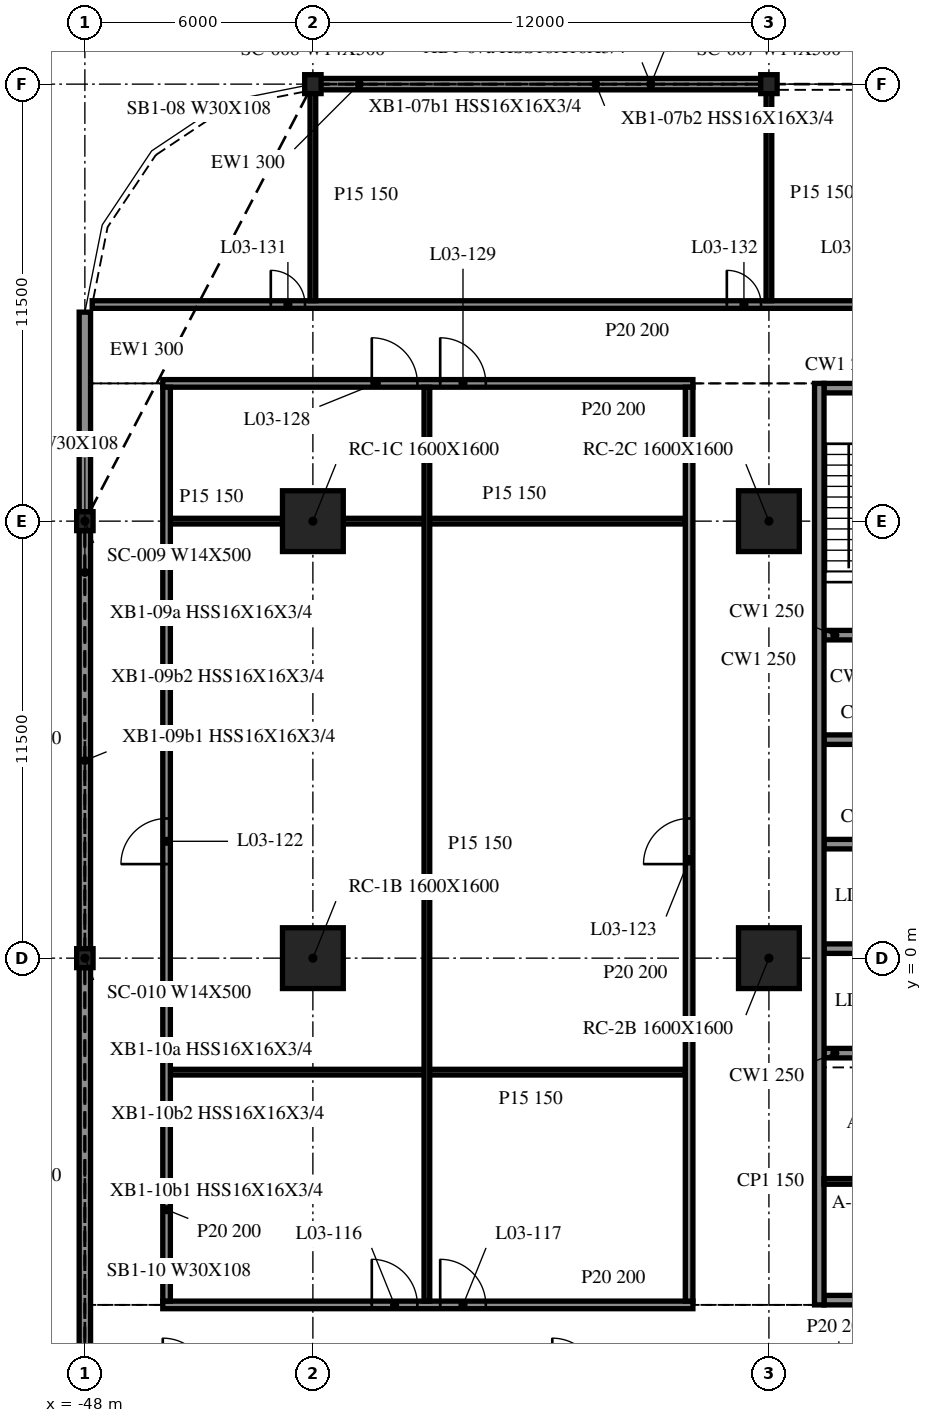
"""IFC4 building model, lengths in metres.
Left out: names, types, materials, properties, quantities, classifications, styles, units other than length and angle.
Written with IfcOpenShell. Run it as: python <this file> out.ifc"""

import sys

from ifc_helpers import new_model, si_unit, direction, frame, frame_2d, origin, origin_2d, place, context, subcontext, project, spatial, rectangle, i_section, extrude, element, fill, save


model = new_model("IFC4")
c1 = context("Model", 3, precision=1e-05, world=origin(), true_north=direction((0.0, 1.0)))
c2 = subcontext(c1, "Body", "Model", "MODEL_VIEW")
j1 = project(units=[si_unit("LENGTHUNIT", "METRE"), si_unit("PLANEANGLEUNIT", "RADIAN")], contexts=[c1])
p1 = place(None, origin())
s1 = spatial("IfcSite", under=j1, at=p1, CompositionType="ELEMENT")
p2 = place(p1, origin())
s2 = spatial("IfcBuilding", under=s1, at=p2, CompositionType="ELEMENT")
p3 = place(p2, frame((0.0, 0.0, 15.8)))
s3 = spatial("IfcBuildingStorey", under=s2, at=p3, CompositionType="ELEMENT", Elevation=15.8)
for number, where, z_axis, x_axis in (
    (1, (-42.0, 0.0, -0.34), (0.0, 0.0, 1.0), (1.0, 0.0, 0.0)),
    (2, (-42.0, 11.5, -0.34), (0.0, 0.0, 1.0), (1.0, 0.0, 0.0)),
    (3, (-30.0, 0.0, -0.34), (0.0, 0.0, 1.0), (1.0, 0.0, 0.0)),
    (4, (-30.0, 11.5, -0.34), (0.0, 0.0, 1.0), (1.0, 0.0, 0.0)),
):
    element("IfcColumn", number, at=place(p3, frame(where, z_axis=z_axis, x_axis=x_axis)), inside=s3, PredefinedType="COLUMN", context=c2, shape_type="SweptSolid", body=[
        extrude(rectangle(XDim=1.6, YDim=1.6, at=origin_2d()), origin(), (0.0, 0.0, 1.0), 4.3),
    ])
for number, where, z_axis, x_axis in (
    (5, (-30.0, 23.0, -0.34), (0.0, 0.0, 1.0), (1.0, 0.0, 0.0)),
    (6, (-42.0, 23.0, -0.34), (0.0, 0.0, 1.0), (1.0, 0.0, 0.0)),
    (7, (-48.0, 11.5, -0.34), (0.0, 0.0, 1.0), (1.0, 0.0, 0.0)),
    (8, (-48.0, 0.0, -0.34), (0.0, 0.0, 1.0), (1.0, 0.0, 0.0)),
):
    element("IfcColumn", number, at=place(p3, frame(where, z_axis=z_axis, x_axis=x_axis)), inside=s3, PredefinedType="COLUMN", context=c2, shape_type="SweptSolid", body=[
        extrude(i_section(OverallWidth=0.432, OverallDepth=0.498, WebThickness=0.056, FlangeThickness=0.089, at=origin_2d()), origin(), (0.0, 0.0, 1.0), 4.3),
    ])
p4 = place(p3, frame((-30.028, 23.0, 0.0), z_axis=(0.0, 0.0, 1.0), x_axis=(-1.0, 0.0, 0.0)))
e9 = element("IfcWall", 9, at=p4, inside=s3, PredefinedType="NOTDEFINED", context=c2, shape_type="SweptSolid", body=[
    extrude(rectangle(XDim=11.944, YDim=0.3, at=frame_2d((5.972, 0.0))), origin(), (0.0, 0.0, 1.0), 3.203),
])
p5 = place(p3, frame((-48.0, 17.0, 0.0), z_axis=(0.0, 0.0, 1.0), x_axis=(0.0, -1.0, 0.0)))
e10 = element("IfcWall", 10, at=p5, inside=s3, PredefinedType="NOTDEFINED", context=c2, shape_type="SweptSolid", body=[
    extrude(rectangle(XDim=5.251, YDim=0.3, at=frame_2d((2.625, 0.0))), origin(), (0.0, 0.0, 1.0), 3.203),
])
for number, where, z_axis, x_axis in (
    (11, (-48.0, 11.251, 0.0), (0.0, 0.0, 1.0), (0.0, -1.0, 0.0)),
    (12, (-48.0, -0.249, 0.0), (0.0, 0.0, 1.0), (0.0, -1.0, 0.0)),
):
    element("IfcWall", number, at=place(p3, frame(where, z_axis=z_axis, x_axis=x_axis)), inside=s3, PredefinedType="NOTDEFINED", context=c2, shape_type="SweptSolid", body=[
        extrude(rectangle(XDim=11.002, YDim=0.3, at=frame_2d((5.501, 0.0))), origin(), (0.0, 0.0, 1.0), 3.203),
    ])
p6 = place(p3, frame((-28.675, 15.125, 0.0), z_axis=(0.0, 0.0, 1.0), x_axis=(0.0, -1.0, 0.0)))
e13 = element("IfcWall", 13, at=p6, inside=s3, PredefinedType="SOLIDWALL", context=c2, shape_type="SweptSolid", body=[
    extrude(rectangle(XDim=24.25, YDim=0.25, at=frame_2d((12.125, 0.0))), origin(), (0.0, 0.0, 1.0), 3.96),
])
p7 = place(p3, frame((-19.45, -9.0, 0.0), z_axis=(0.0, 0.0, 1.0), x_axis=(-1.0, 0.0, 0.0)))
e14 = element("IfcWall", 14, at=p7, inside=s3, PredefinedType="SOLIDWALL", context=c2, shape_type="SweptSolid", body=[
    extrude(rectangle(XDim=9.1, YDim=0.25, at=frame_2d((4.55, 0.0))), origin(), (0.0, 0.0, 1.0), 3.96),
])
p8 = place(p7, frame((3.65, 0.0, 0.0)))
e15 = element("IfcOpeningElement", 15, at=p8, cuts=e14, PredefinedType="OPENING", context=c2, shape_type="SweptSolid", body=[
    extrude(rectangle(XDim=1.8, YDim=2.1, at=frame_2d((0.9, 1.05))), frame((0.0, 0.135, 0.0), z_axis=(0.0, -1.0, 0.0), x_axis=(1.0, 0.0, 0.0)), (0.0, 0.0, 1.0), 0.27),
])
p9 = place(p3, frame((-28.55, 15.0, 0.0), z_axis=(0.0, 0.0, 1.0), x_axis=(1.0, 0.0, 0.0)))
e16 = element("IfcWall", 16, at=p9, inside=s3, PredefinedType="SOLIDWALL", context=c2, shape_type="SweptSolid", body=[
    extrude(rectangle(XDim=9.1, YDim=0.25, at=frame_2d((4.55, 0.0))), origin(), (0.0, 0.0, 1.0), 3.96),
])
p10 = place(p9, frame((3.65, 0.0, 0.0)))
e17 = element("IfcOpeningElement", 17, at=p10, cuts=e16, PredefinedType="OPENING", context=c2, shape_type="SweptSolid", body=[
    extrude(rectangle(XDim=1.8, YDim=2.1, at=frame_2d((0.9, 1.05))), frame((0.0, 0.135, 0.0), z_axis=(0.0, -1.0, 0.0), x_axis=(1.0, 0.0, 0.0)), (0.0, 0.0, 1.0), 0.27),
])
for number, where, z_axis, x_axis in (
    (18, (-28.55, -2.5, 0.0), (0.0, 0.0, 1.0), (1.0, 0.0, 0.0)),
    (19, (-28.55, 0.25, 0.0), (0.0, 0.0, 1.0), (1.0, 0.0, 0.0)),
    (20, (-28.55, 3.0, 0.0), (0.0, 0.0, 1.0), (1.0, 0.0, 0.0)),
    (21, (-28.55, 5.75, 0.0), (0.0, 0.0, 1.0), (1.0, 0.0, 0.0)),
    (22, (-28.55, 8.5, 0.0), (0.0, 0.0, 1.0), (1.0, 0.0, 0.0)),
):
    element("IfcWall", number, at=place(p3, frame(where, z_axis=z_axis, x_axis=x_axis)), inside=s3, PredefinedType="SOLIDWALL", context=c2, shape_type="SweptSolid", body=[
        extrude(rectangle(XDim=2.85, YDim=0.25, at=frame_2d((1.425, 0.0))), origin(), (0.0, 0.0, 1.0), 3.96),
    ])
p11 = place(p3, frame((-28.55, -5.875, 0.0), z_axis=(0.0, 0.0, 1.0), x_axis=(1.0, 0.0, 0.0)))
e23 = element("IfcWall", 23, at=p11, inside=s3, PredefinedType="PARTITIONING", context=c2, shape_type="SweptSolid", body=[
    extrude(rectangle(XDim=2.85, YDim=0.15, at=frame_2d((1.425, 0.0))), origin(), (0.0, 0.0, 1.0), 3.96),
])
p12 = place(p3, frame((-45.95, -9.125, 0.0), z_axis=(0.0, 0.0, 1.0), x_axis=(1.0, 0.0, 0.0)))
e24 = element("IfcWall", 24, at=p12, inside=s3, PredefinedType="PARTITIONING", context=c2, shape_type="SweptSolid", body=[
    extrude(rectangle(XDim=13.95, YDim=0.2, at=frame_2d((6.975, 0.0))), origin(), (0.0, 0.0, 1.0), 3.96),
])
p13 = place(p12, frame((5.5, 0.0, 0.0)))
e25 = element("IfcOpeningElement", 25, at=p13, cuts=e24, PredefinedType="OPENING", context=c2, shape_type="SweptSolid", body=[
    extrude(rectangle(XDim=1.2, YDim=2.1, at=frame_2d((0.6, 1.05))), frame((0.0, 0.11, 0.0), z_axis=(0.0, -1.0, 0.0), x_axis=(1.0, 0.0, 0.0)), (0.0, 0.0, 1.0), 0.22),
])
p14 = place(p12, frame((7.3, 0.0, 0.0)))
e26 = element("IfcOpeningElement", 26, at=p14, cuts=e24, PredefinedType="OPENING", context=c2, shape_type="SweptSolid", body=[
    extrude(rectangle(XDim=1.2, YDim=2.1, at=frame_2d((0.6, 1.05))), frame((0.0, 0.11, 0.0), z_axis=(0.0, -1.0, 0.0), x_axis=(1.0, 0.0, 0.0)), (0.0, 0.0, 1.0), 0.22),
])
p15 = place(p3, frame((-45.75, -3.0, 0.0), z_axis=(0.0, 0.0, 1.0), x_axis=(1.0, 0.0, 0.0)))
e27 = element("IfcWall", 27, at=p15, inside=s3, PredefinedType="PARTITIONING", context=c2, shape_type="SweptSolid", body=[
    extrude(rectangle(XDim=13.55, YDim=0.15, at=frame_2d((6.775, 0.0))), origin(), (0.0, 0.0, 1.0), 3.96),
])
p16 = place(p3, frame((-45.75, 11.5, 0.0), z_axis=(0.0, 0.0, 1.0), x_axis=(1.0, 0.0, 0.0)))
e28 = element("IfcWall", 28, at=p16, inside=s3, PredefinedType="PARTITIONING", context=c2, shape_type="SweptSolid", body=[
    extrude(rectangle(XDim=2.95, YDim=0.15, at=frame_2d((1.475, 0.0))), origin(), (0.0, 0.0, 1.0), 3.96),
])
p17 = place(p3, frame((-41.2, 11.5, 0.0), z_axis=(0.0, 0.0, 1.0), x_axis=(1.0, 0.0, 0.0)))
e29 = element("IfcWall", 29, at=p17, inside=s3, PredefinedType="PARTITIONING", context=c2, shape_type="SweptSolid", body=[
    extrude(rectangle(XDim=9.0, YDim=0.15, at=frame_2d((4.5, 0.0))), origin(), (0.0, 0.0, 1.0), 3.96),
])
p18 = place(p3, frame((-45.95, 15.125, 0.0), z_axis=(0.0, 0.0, 1.0), x_axis=(1.0, 0.0, 0.0)))
e30 = element("IfcWall", 30, at=p18, inside=s3, PredefinedType="PARTITIONING", context=c2, shape_type="SweptSolid", body=[
    extrude(rectangle(XDim=13.95, YDim=0.2, at=frame_2d((6.975, 0.0))), origin(), (0.0, 0.0, 1.0), 3.96),
])
p19 = place(p18, frame((5.5, 0.0, 0.0)))
e31 = element("IfcOpeningElement", 31, at=p19, cuts=e30, PredefinedType="OPENING", context=c2, shape_type="SweptSolid", body=[
    extrude(rectangle(XDim=1.2, YDim=2.1, at=frame_2d((0.6, 1.05))), frame((0.0, 0.11, 0.0), z_axis=(0.0, -1.0, 0.0), x_axis=(1.0, 0.0, 0.0)), (0.0, 0.0, 1.0), 0.22),
])
p20 = place(p18, frame((7.3, 0.0, 0.0)))
e32 = element("IfcOpeningElement", 32, at=p20, cuts=e30, PredefinedType="OPENING", context=c2, shape_type="SweptSolid", body=[
    extrude(rectangle(XDim=1.2, YDim=2.1, at=frame_2d((0.6, 1.05))), frame((0.0, 0.11, 0.0), z_axis=(0.0, -1.0, 0.0), x_axis=(1.0, 0.0, 0.0)), (0.0, 0.0, 1.0), 0.22),
])
p21 = place(p3, frame((-47.807, 17.2, 0.0), z_axis=(0.0, 0.0, 1.0), x_axis=(1.0, 0.0, 0.0)))
e33 = element("IfcWall", 33, at=p21, inside=s3, PredefinedType="PARTITIONING", context=c2, shape_type="SweptSolid", body=[
    extrude(rectangle(XDim=95.615, YDim=0.2, at=frame_2d((47.807, 0.0))), origin(), (0.0, 0.0, 1.0), 3.96),
])
p22 = place(p21, frame((4.7, 0.0, 0.0)))
e34 = element("IfcOpeningElement", 34, at=p22, cuts=e33, PredefinedType="OPENING", context=c2, shape_type="SweptSolid", body=[
    extrude(rectangle(XDim=0.9, YDim=2.1, at=frame_2d((0.45, 1.05))), frame((0.0, 0.11, 0.0), z_axis=(0.0, -1.0, 0.0), x_axis=(1.0, 0.0, 0.0)), (0.0, 0.0, 1.0), 0.22),
])
p23 = place(p21, frame((16.7, 0.0, 0.0)))
e35 = element("IfcOpeningElement", 35, at=p23, cuts=e33, PredefinedType="OPENING", context=c2, shape_type="SweptSolid", body=[
    extrude(rectangle(XDim=0.9, YDim=2.1, at=frame_2d((0.45, 1.05))), frame((0.0, 0.11, 0.0), z_axis=(0.0, -1.0, 0.0), x_axis=(1.0, 0.0, 0.0)), (0.0, 0.0, 1.0), 0.22),
])
p24 = place(p21, frame((20.1, 0.0, 0.0)))
e36 = element("IfcOpeningElement", 36, at=p24, cuts=e33, PredefinedType="OPENING", context=c2, shape_type="SweptSolid", body=[
    extrude(rectangle(XDim=0.9, YDim=2.1, at=frame_2d((0.45, 1.05))), frame((0.0, 0.11, 0.0), z_axis=(0.0, -1.0, 0.0), x_axis=(1.0, 0.0, 0.0)), (0.0, 0.0, 1.0), 0.22),
])
p25 = place(p21, frame((22.7, 0.0, 0.0)))
e37 = element("IfcOpeningElement", 37, at=p25, cuts=e33, PredefinedType="OPENING", context=c2, shape_type="SweptSolid", body=[
    extrude(rectangle(XDim=0.9, YDim=2.1, at=frame_2d((0.45, 1.05))), frame((0.0, 0.11, 0.0), z_axis=(0.0, -1.0, 0.0), x_axis=(1.0, 0.0, 0.0)), (0.0, 0.0, 1.0), 0.22),
])
p26 = place(p21, frame((28.7, 0.0, 0.0)))
e38 = element("IfcOpeningElement", 38, at=p26, cuts=e33, PredefinedType="OPENING", context=c2, shape_type="SweptSolid", body=[
    extrude(rectangle(XDim=0.9, YDim=2.1, at=frame_2d((0.45, 1.05))), frame((0.0, 0.11, 0.0), z_axis=(0.0, -1.0, 0.0), x_axis=(1.0, 0.0, 0.0)), (0.0, 0.0, 1.0), 0.22),
])
p27 = place(p21, frame((40.7, 0.0, 0.0)))
e39 = element("IfcOpeningElement", 39, at=p27, cuts=e33, PredefinedType="OPENING", context=c2, shape_type="SweptSolid", body=[
    extrude(rectangle(XDim=0.9, YDim=2.1, at=frame_2d((0.45, 1.05))), frame((0.0, 0.11, 0.0), z_axis=(0.0, -1.0, 0.0), x_axis=(1.0, 0.0, 0.0)), (0.0, 0.0, 1.0), 0.22),
])
p28 = place(p21, frame((44.1, 0.0, 0.0)))
e40 = element("IfcOpeningElement", 40, at=p28, cuts=e33, PredefinedType="OPENING", context=c2, shape_type="SweptSolid", body=[
    extrude(rectangle(XDim=0.9, YDim=2.1, at=frame_2d((0.45, 1.05))), frame((0.0, 0.11, 0.0), z_axis=(0.0, -1.0, 0.0), x_axis=(1.0, 0.0, 0.0)), (0.0, 0.0, 1.0), 0.22),
])
p29 = place(p21, frame((46.7, 0.0, 0.0)))
e41 = element("IfcOpeningElement", 41, at=p29, cuts=e33, PredefinedType="OPENING", context=c2, shape_type="SweptSolid", body=[
    extrude(rectangle(XDim=0.9, YDim=2.1, at=frame_2d((0.45, 1.05))), frame((0.0, 0.11, 0.0), z_axis=(0.0, -1.0, 0.0), x_axis=(1.0, 0.0, 0.0)), (0.0, 0.0, 1.0), 0.22),
])
p30 = place(p21, frame((48.1, 0.0, 0.0)))
e42 = element("IfcOpeningElement", 42, at=p30, cuts=e33, PredefinedType="OPENING", context=c2, shape_type="SweptSolid", body=[
    extrude(rectangle(XDim=0.9, YDim=2.1, at=frame_2d((0.45, 1.05))), frame((0.0, 0.11, 0.0), z_axis=(0.0, -1.0, 0.0), x_axis=(1.0, 0.0, 0.0)), (0.0, 0.0, 1.0), 0.22),
])
p31 = place(p21, frame((54.1, 0.0, 0.0)))
e43 = element("IfcOpeningElement", 43, at=p31, cuts=e33, PredefinedType="OPENING", context=c2, shape_type="SweptSolid", body=[
    extrude(rectangle(XDim=0.9, YDim=2.1, at=frame_2d((0.45, 1.05))), frame((0.0, 0.11, 0.0), z_axis=(0.0, -1.0, 0.0), x_axis=(1.0, 0.0, 0.0)), (0.0, 0.0, 1.0), 0.22),
])
p32 = place(p21, frame((66.1, 0.0, 0.0)))
e44 = element("IfcOpeningElement", 44, at=p32, cuts=e33, PredefinedType="OPENING", context=c2, shape_type="SweptSolid", body=[
    extrude(rectangle(XDim=0.9, YDim=2.1, at=frame_2d((0.45, 1.05))), frame((0.0, 0.11, 0.0), z_axis=(0.0, -1.0, 0.0), x_axis=(1.0, 0.0, 0.0)), (0.0, 0.0, 1.0), 0.22),
])
p33 = place(p21, frame((69.5, 0.0, 0.0)))
e45 = element("IfcOpeningElement", 45, at=p33, cuts=e33, PredefinedType="OPENING", context=c2, shape_type="SweptSolid", body=[
    extrude(rectangle(XDim=0.9, YDim=2.1, at=frame_2d((0.45, 1.05))), frame((0.0, 0.11, 0.0), z_axis=(0.0, -1.0, 0.0), x_axis=(1.0, 0.0, 0.0)), (0.0, 0.0, 1.0), 0.22),
])
p34 = place(p21, frame((72.1, 0.0, 0.0)))
e46 = element("IfcOpeningElement", 46, at=p34, cuts=e33, PredefinedType="OPENING", context=c2, shape_type="SweptSolid", body=[
    extrude(rectangle(XDim=0.9, YDim=2.1, at=frame_2d((0.45, 1.05))), frame((0.0, 0.11, 0.0), z_axis=(0.0, -1.0, 0.0), x_axis=(1.0, 0.0, 0.0)), (0.0, 0.0, 1.0), 0.22),
])
p35 = place(p21, frame((78.1, 0.0, 0.0)))
e47 = element("IfcOpeningElement", 47, at=p35, cuts=e33, PredefinedType="OPENING", context=c2, shape_type="SweptSolid", body=[
    extrude(rectangle(XDim=0.9, YDim=2.1, at=frame_2d((0.45, 1.05))), frame((0.0, 0.11, 0.0), z_axis=(0.0, -1.0, 0.0), x_axis=(1.0, 0.0, 0.0)), (0.0, 0.0, 1.0), 0.22),
])
p36 = place(p21, frame((90.1, 0.0, 0.0)))
e48 = element("IfcOpeningElement", 48, at=p36, cuts=e33, PredefinedType="OPENING", context=c2, shape_type="SweptSolid", body=[
    extrude(rectangle(XDim=0.9, YDim=2.1, at=frame_2d((0.45, 1.05))), frame((0.0, 0.11, 0.0), z_axis=(0.0, -1.0, 0.0), x_axis=(1.0, 0.0, 0.0)), (0.0, 0.0, 1.0), 0.22),
])
p37 = place(p3, frame((-45.85, -9.025, 0.0), z_axis=(0.0, 0.0, 1.0), x_axis=(0.0, 1.0, 0.0)))
e49 = element("IfcWall", 49, at=p37, inside=s3, PredefinedType="PARTITIONING", context=c2, shape_type="SweptSolid", body=[
    extrude(rectangle(XDim=24.05, YDim=0.2, at=frame_2d((12.025, 0.0))), origin(), (0.0, 0.0, 1.0), 3.96),
])
p38 = place(p37, frame((11.5, 0.0, 0.0)))
e50 = element("IfcOpeningElement", 50, at=p38, cuts=e49, PredefinedType="OPENING", context=c2, shape_type="SweptSolid", body=[
    extrude(rectangle(XDim=1.2, YDim=2.1, at=frame_2d((0.6, 1.05))), frame((0.0, 0.11, 0.0), z_axis=(0.0, -1.0, 0.0), x_axis=(1.0, 0.0, 0.0)), (0.0, 0.0, 1.0), 0.22),
])
p39 = place(p3, frame((-42.0, 17.3, 0.0), z_axis=(0.0, 0.0, 1.0), x_axis=(0.0, 1.0, 0.0)))
e51 = element("IfcWall", 51, at=p39, inside=s3, PredefinedType="PARTITIONING", context=c2, shape_type="SweptSolid", body=[
    extrude(rectangle(XDim=5.547, YDim=0.15, at=frame_2d((2.773, 0.0))), origin(), (0.0, 0.0, 1.0), 3.96),
])
p40 = place(p3, frame((-39.0, -9.025, 0.0), z_axis=(0.0, 0.0, 1.0), x_axis=(0.0, 1.0, 0.0)))
e52 = element("IfcWall", 52, at=p40, inside=s3, PredefinedType="PARTITIONING", context=c2, shape_type="SweptSolid", body=[
    extrude(rectangle(XDim=24.05, YDim=0.15, at=frame_2d((12.025, 0.0))), origin(), (0.0, 0.0, 1.0), 3.96),
])
p41 = place(p3, frame((-32.1, -9.025, 0.0), z_axis=(0.0, 0.0, 1.0), x_axis=(0.0, 1.0, 0.0)))
e53 = element("IfcWall", 53, at=p41, inside=s3, PredefinedType="PARTITIONING", context=c2, shape_type="SweptSolid", body=[
    extrude(rectangle(XDim=24.05, YDim=0.2, at=frame_2d((12.025, 0.0))), origin(), (0.0, 0.0, 1.0), 3.96),
])
p42 = place(p41, frame((11.5, 0.0, 0.0)))
e54 = element("IfcOpeningElement", 54, at=p42, cuts=e53, PredefinedType="OPENING", context=c2, shape_type="SweptSolid", body=[
    extrude(rectangle(XDim=1.2, YDim=2.1, at=frame_2d((0.6, 1.05))), frame((0.0, 0.11, 0.0), z_axis=(0.0, -1.0, 0.0), x_axis=(1.0, 0.0, 0.0)), (0.0, 0.0, 1.0), 0.22),
])
p43 = place(p3, frame((-30.0, 17.3, 0.0), z_axis=(0.0, 0.0, 1.0), x_axis=(0.0, 1.0, 0.0)))
e55 = element("IfcWall", 55, at=p43, inside=s3, PredefinedType="PARTITIONING", context=c2, shape_type="SweptSolid", body=[
    extrude(rectangle(XDim=5.675, YDim=0.15, at=frame_2d((2.837, 0.0))), origin(), (0.0, 0.0, 1.0), 3.96),
])
p44 = place(p13, origin())
e56 = element("IfcDoor", 56, at=p44, inside=s3, OperationType="SINGLE_SWING_LEFT", PredefinedType="DOOR", context=c2, shape_type="SweptSolid", body=[
    extrude(rectangle(XDim=1.2, YDim=2.1, at=frame_2d((0.6, 1.05))), frame((0.0, 0.025, 0.0), z_axis=(0.0, -1.0, 0.0), x_axis=(1.0, 0.0, 0.0)), (0.0, 0.0, 1.0), 0.05),
])
fill(e25, e56)
p45 = place(p14, origin())
e57 = element("IfcDoor", 57, at=p45, inside=s3, OperationType="SINGLE_SWING_RIGHT", PredefinedType="DOOR", context=c2, shape_type="SweptSolid", body=[
    extrude(rectangle(XDim=1.2, YDim=2.1, at=frame_2d((0.6, 1.05))), frame((0.0, 0.025, 0.0), z_axis=(0.0, -1.0, 0.0), x_axis=(1.0, 0.0, 0.0)), (0.0, 0.0, 1.0), 0.05),
])
fill(e26, e57)
p46 = place(p38, origin())
e58 = element("IfcDoor", 58, at=p46, inside=s3, OperationType="SINGLE_SWING_LEFT", PredefinedType="DOOR", context=c2, shape_type="SweptSolid", body=[
    extrude(rectangle(XDim=1.2, YDim=2.1, at=frame_2d((0.6, 1.05))), frame((0.0, 0.025, 0.0), z_axis=(0.0, -1.0, 0.0), x_axis=(1.0, 0.0, 0.0)), (0.0, 0.0, 1.0), 0.05),
])
fill(e50, e58)
p47 = place(p42, origin())
e59 = element("IfcDoor", 59, at=p47, inside=s3, OperationType="SINGLE_SWING_RIGHT", PredefinedType="DOOR", context=c2, shape_type="SweptSolid", body=[
    extrude(rectangle(XDim=1.2, YDim=2.1, at=frame_2d((0.6, 1.05))), frame((0.0, 0.025, 0.0), z_axis=(0.0, -1.0, 0.0), x_axis=(1.0, 0.0, 0.0)), (0.0, 0.0, 1.0), 0.05),
])
fill(e54, e59)
p48 = place(p19, origin())
e60 = element("IfcDoor", 60, at=p48, inside=s3, OperationType="SINGLE_SWING_RIGHT", PredefinedType="DOOR", context=c2, shape_type="SweptSolid", body=[
    extrude(rectangle(XDim=1.2, YDim=2.1, at=frame_2d((0.6, 1.05))), frame((0.0, 0.025, 0.0), z_axis=(0.0, -1.0, 0.0), x_axis=(1.0, 0.0, 0.0)), (0.0, 0.0, 1.0), 0.05),
])
fill(e31, e60)
p49 = place(p20, origin())
e61 = element("IfcDoor", 61, at=p49, inside=s3, OperationType="SINGLE_SWING_LEFT", PredefinedType="DOOR", context=c2, shape_type="SweptSolid", body=[
    extrude(rectangle(XDim=1.2, YDim=2.1, at=frame_2d((0.6, 1.05))), frame((0.0, 0.025, 0.0), z_axis=(0.0, -1.0, 0.0), x_axis=(1.0, 0.0, 0.0)), (0.0, 0.0, 1.0), 0.05),
])
fill(e32, e61)
p50 = place(p22, origin())
e62 = element("IfcDoor", 62, at=p50, inside=s3, OperationType="SINGLE_SWING_LEFT", PredefinedType="DOOR", context=c2, shape_type="SweptSolid", body=[
    extrude(rectangle(XDim=0.9, YDim=2.1, at=frame_2d((0.45, 1.05))), frame((0.0, 0.025, 0.0), z_axis=(0.0, -1.0, 0.0), x_axis=(1.0, 0.0, 0.0)), (0.0, 0.0, 1.0), 0.05),
])
fill(e34, e62)
p51 = place(p23, origin())
e63 = element("IfcDoor", 63, at=p51, inside=s3, OperationType="SINGLE_SWING_LEFT", PredefinedType="DOOR", context=c2, shape_type="SweptSolid", body=[
    extrude(rectangle(XDim=0.9, YDim=2.1, at=frame_2d((0.45, 1.05))), frame((0.0, 0.025, 0.0), z_axis=(0.0, -1.0, 0.0), x_axis=(1.0, 0.0, 0.0)), (0.0, 0.0, 1.0), 0.05),
])
fill(e35, e63)
save(model, sys.argv[1])
